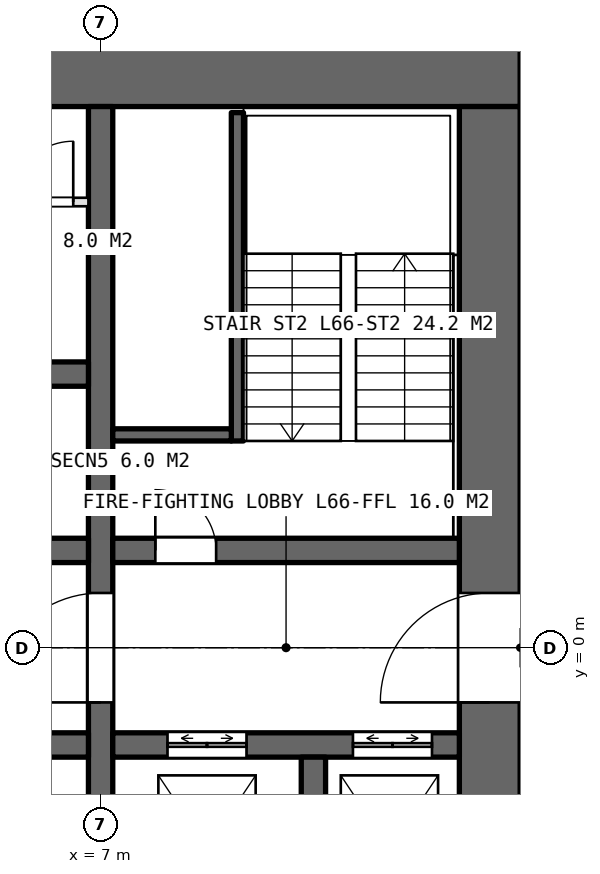
"""IFC4 building model, lengths in metres.
Left out: names, types, materials, properties, quantities, classifications, styles, units other than length and angle.
Written with IfcOpenShell. Run it as: python <this file> out.ifc"""

import sys

from ifc_helpers import new_model, si_unit, direction, frame, frame_2d, origin, place, context, subcontext, project, spatial, rectangle, extrude, element, fill, save


model = new_model("IFC4")
c1 = context("Model", 3, precision=1e-05, world=origin(), true_north=direction((0.0, 1.0)))
c2 = subcontext(c1, "Body", "Model", "MODEL_VIEW")
j1 = project(units=[si_unit("LENGTHUNIT", "METRE"), si_unit("PLANEANGLEUNIT", "RADIAN")], contexts=[c1])
p1 = place(None, origin())
s1 = spatial("IfcSite", under=j1, at=p1, CompositionType="ELEMENT")
p2 = place(p1, origin())
s2 = spatial("IfcBuilding", under=s1, at=p2, CompositionType="ELEMENT")
p3 = place(p2, frame((0.0, 0.0, 296.4)))
s3 = spatial("IfcBuildingStorey", under=s2, at=p3, CompositionType="ELEMENT", Elevation=296.4)
p4 = place(p3, frame((13.9, 9.4, 0.0), z_axis=(0.0, 0.0, 1.0), x_axis=(-1.0, 0.0, 0.0)))
e1 = element("IfcWall", 1, at=p4, inside=s3, PredefinedType="SHEAR", context=c2, shape_type="SweptSolid", body=[
    extrude(rectangle(XDim=27.8, YDim=1.0, at=frame_2d((13.9, 0.0))), origin(), (0.0, 0.0, 1.0), 4.2),
])
p5 = place(p4, frame((23.9, 0.0, 0.0)))
e2 = element("IfcOpeningElement", 2, at=p5, cuts=e1, PredefinedType="OPENING", context=c2, shape_type="SweptSolid", body=[
    extrude(rectangle(XDim=1.0, YDim=2.4, at=frame_2d((0.5, 1.2))), frame((0.0, 0.51, 0.0), z_axis=(0.0, -1.0, 0.0), x_axis=(1.0, 0.0, 0.0)), (0.0, 0.0, 1.0), 1.02),
])
p6 = place(p4, frame((13.0, 0.0, 0.0)))
e3 = element("IfcOpeningElement", 3, at=p6, cuts=e1, PredefinedType="OPENING", context=c2, shape_type="SweptSolid", body=[
    extrude(rectangle(XDim=1.8, YDim=2.4, at=frame_2d((0.9, 1.2))), frame((0.0, 0.51, 0.0), z_axis=(0.0, -1.0, 0.0), x_axis=(1.0, 0.0, 0.0)), (0.0, 0.0, 1.0), 1.02),
])
p7 = place(p3, frame((13.4, -8.9, 0.0), z_axis=(0.0, 0.0, 1.0), x_axis=(0.0, 1.0, 0.0)))
e4 = element("IfcWall", 4, at=p7, inside=s3, PredefinedType="SHEAR", context=c2, shape_type="SweptSolid", body=[
    extrude(rectangle(XDim=17.8, YDim=1.0, at=frame_2d((8.9, 0.0))), origin(), (0.0, 0.0, 1.0), 4.2),
])
p8 = place(p7, frame((8.0, 0.0, 0.0)))
e5 = element("IfcOpeningElement", 5, at=p8, cuts=e4, PredefinedType="OPENING", context=c2, shape_type="SweptSolid", body=[
    extrude(rectangle(XDim=1.8, YDim=2.4, at=frame_2d((0.9, 1.2))), frame((0.0, 0.51, 0.0), z_axis=(0.0, -1.0, 0.0), x_axis=(1.0, 0.0, 0.0)), (0.0, 0.0, 1.0), 1.02),
])
p9 = place(p3, frame((7.0, -8.9, 0.0), z_axis=(0.0, 0.0, 1.0), x_axis=(0.0, 1.0, 0.0)))
e6 = element("IfcWall", 6, at=p9, inside=s3, PredefinedType="SHEAR", context=c2, shape_type="SweptSolid", body=[
    extrude(rectangle(XDim=17.8, YDim=0.4, at=frame_2d((8.9, 0.0))), origin(), (0.0, 0.0, 1.0), 4.2),
])
p10 = place(p9, frame((8.0, 0.0, 0.0)))
e7 = element("IfcOpeningElement", 7, at=p10, cuts=e6, PredefinedType="OPENING", context=c2, shape_type="SweptSolid", body=[
    extrude(rectangle(XDim=1.8, YDim=2.4, at=frame_2d((0.9, 1.2))), frame((0.0, 0.21, 0.0), z_axis=(0.0, -1.0, 0.0), x_axis=(1.0, 0.0, 0.0)), (0.0, 0.0, 1.0), 0.42),
])
p11 = place(p3, frame((-6.8, 1.6, 0.0), z_axis=(0.0, 0.0, 1.0), x_axis=(1.0, 0.0, 0.0)))
e8 = element("IfcWall", 8, at=p11, inside=s3, PredefinedType="SHEAR", context=c2, shape_type="SweptSolid", body=[
    extrude(rectangle(XDim=13.6, YDim=0.4, at=frame_2d((6.8, 0.0))), origin(), (0.0, 0.0, 1.0), 4.2),
])
p12 = place(p11, frame((1.265, 0.0, 0.0)))
e9 = element("IfcOpeningElement", 9, at=p12, cuts=e8, PredefinedType="OPENING", context=c2, shape_type="SweptSolid", body=[
    extrude(rectangle(XDim=1.0, YDim=2.4, at=frame_2d((0.5, 1.2))), frame((0.0, 0.21, 0.0), z_axis=(0.0, -1.0, 0.0), x_axis=(1.0, 0.0, 0.0)), (0.0, 0.0, 1.0), 0.42),
])
p13 = place(p11, frame((4.0, 0.0, 0.0)))
e10 = element("IfcOpeningElement", 10, at=p13, cuts=e8, PredefinedType="OPENING", context=c2, shape_type="SweptSolid", body=[
    extrude(rectangle(XDim=1.0, YDim=2.4, at=frame_2d((0.5, 1.2))), frame((0.0, 0.21, 0.0), z_axis=(0.0, -1.0, 0.0), x_axis=(1.0, 0.0, 0.0)), (0.0, 0.0, 1.0), 0.42),
])
p14 = place(p11, frame((7.635, 0.0, 0.0)))
e11 = element("IfcOpeningElement", 11, at=p14, cuts=e8, PredefinedType="OPENING", context=c2, shape_type="SweptSolid", body=[
    extrude(rectangle(XDim=1.0, YDim=2.4, at=frame_2d((0.5, 1.2))), frame((0.0, 0.21, 0.0), z_axis=(0.0, -1.0, 0.0), x_axis=(1.0, 0.0, 0.0)), (0.0, 0.0, 1.0), 0.42),
])
p15 = place(p11, frame((11.9, 0.0, 0.0)))
e12 = element("IfcOpeningElement", 12, at=p15, cuts=e8, PredefinedType="OPENING", context=c2, shape_type="SweptSolid", body=[
    extrude(rectangle(XDim=1.0, YDim=2.4, at=frame_2d((0.5, 1.2))), frame((0.0, 0.21, 0.0), z_axis=(0.0, -1.0, 0.0), x_axis=(1.0, 0.0, 0.0)), (0.0, 0.0, 1.0), 0.42),
])
p16 = place(p3, frame((-6.8, -1.6, 0.0), z_axis=(0.0, 0.0, 1.0), x_axis=(1.0, 0.0, 0.0)))
e13 = element("IfcWall", 13, at=p16, inside=s3, PredefinedType="SHEAR", context=c2, shape_type="SweptSolid", body=[
    extrude(rectangle(XDim=13.6, YDim=0.4, at=frame_2d((6.8, 0.0))), origin(), (0.0, 0.0, 1.0), 4.2),
])
p17 = place(p16, frame((11.9, 0.0, 0.0)))
e14 = element("IfcOpeningElement", 14, at=p17, cuts=e13, PredefinedType="OPENING", context=c2, shape_type="SweptSolid", body=[
    extrude(rectangle(XDim=1.0, YDim=2.4, at=frame_2d((0.5, 1.2))), frame((0.0, 0.21, 0.0), z_axis=(0.0, -1.0, 0.0), x_axis=(1.0, 0.0, 0.0)), (0.0, 0.0, 1.0), 0.42),
])
p18 = place(p16, frame((4.5, 0.0, 0.0)))
e15 = element("IfcOpeningElement", 15, at=p18, cuts=e13, PredefinedType="OPENING", context=c2, shape_type="SweptSolid", body=[
    extrude(rectangle(XDim=1.8, YDim=2.4, at=frame_2d((0.9, 1.2))), frame((0.0, 0.21, 0.0), z_axis=(0.0, -1.0, 0.0), x_axis=(1.0, 0.0, 0.0)), (0.0, 0.0, 1.0), 0.42),
])
p19 = place(p3, frame((-6.8, 4.5, 0.0), z_axis=(0.0, 0.0, 1.0), x_axis=(1.0, 0.0, 0.0)))
e16 = element("IfcWall", 16, at=p19, inside=s3, PredefinedType="SHEAR", context=c2, shape_type="SweptSolid", body=[
    extrude(rectangle(XDim=13.6, YDim=0.4, at=frame_2d((6.8, 0.0))), origin(), (0.0, 0.0, 1.0), 4.2),
])
p20 = place(p3, frame((7.2, 1.6, 0.0), z_axis=(0.0, 0.0, 1.0), x_axis=(1.0, 0.0, 0.0)))
e17 = element("IfcWall", 17, at=p20, inside=s3, PredefinedType="SHEAR", context=c2, shape_type="SweptSolid", body=[
    extrude(rectangle(XDim=5.7, YDim=0.4, at=frame_2d((2.85, 0.0))), origin(), (0.0, 0.0, 1.0), 4.2),
])
p21 = place(p20, frame((0.7, 0.0, 0.0)))
e18 = element("IfcOpeningElement", 18, at=p21, cuts=e17, PredefinedType="OPENING", context=c2, shape_type="SweptSolid", body=[
    extrude(rectangle(XDim=1.0, YDim=2.4, at=frame_2d((0.5, 1.2))), frame((0.0, 0.21, 0.0), z_axis=(0.0, -1.0, 0.0), x_axis=(1.0, 0.0, 0.0)), (0.0, 0.0, 1.0), 0.42),
])
p22 = place(p3, frame((7.2, -1.6, 0.0), z_axis=(0.0, 0.0, 1.0), x_axis=(1.0, 0.0, 0.0)))
e19 = element("IfcWall", 19, at=p22, inside=s3, PredefinedType="SHEAR", context=c2, shape_type="SweptSolid", body=[
    extrude(rectangle(XDim=5.7, YDim=0.4, at=frame_2d((2.85, 0.0))), origin(), (0.0, 0.0, 1.0), 4.2),
])
p23 = place(p22, frame((0.9, 0.0, 0.0)))
e20 = element("IfcOpeningElement", 20, at=p23, cuts=e19, PredefinedType="OPENING", context=c2, shape_type="SweptSolid", body=[
    extrude(rectangle(XDim=1.3, YDim=2.4, at=frame_2d((0.65, 1.2))), frame((0.0, 0.21, 0.0), z_axis=(0.0, -1.0, 0.0), x_axis=(1.0, 0.0, 0.0)), (0.0, 0.0, 1.0), 0.42),
])
p24 = place(p22, frame((3.95, 0.0, 0.0)))
e21 = element("IfcOpeningElement", 21, at=p24, cuts=e19, PredefinedType="OPENING", context=c2, shape_type="SweptSolid", body=[
    extrude(rectangle(XDim=1.3, YDim=2.4, at=frame_2d((0.65, 1.2))), frame((0.0, 0.21, 0.0), z_axis=(0.0, -1.0, 0.0), x_axis=(1.0, 0.0, 0.0)), (0.0, 0.0, 1.0), 0.42),
])
p25 = place(p3, frame((10.5, -4.8, 0.0), z_axis=(0.0, 0.0, 1.0), x_axis=(0.0, 1.0, 0.0)))
e22 = element("IfcWall", 22, at=p25, inside=s3, PredefinedType="SHEAR", context=c2, shape_type="SweptSolid", body=[
    extrude(rectangle(XDim=3.0, YDim=0.4, at=frame_2d((1.5, 0.0))), origin(), (0.0, 0.0, 1.0), 4.2),
])
p26 = place(p3, frame((-6.8, 7.33, 0.0), z_axis=(0.0, 0.0, 1.0), x_axis=(1.0, 0.0, 0.0)))
e23 = element("IfcWall", 23, at=p26, inside=s3, PredefinedType="PARTITIONING", context=c2, shape_type="SweptSolid", body=[
    extrude(rectangle(XDim=13.6, YDim=0.14, at=frame_2d((6.8, 0.0))), origin(), (0.0, 0.0, 1.0), 3.95),
])
p27 = place(p26, frame((0.58, 0.0, 0.0)))
e24 = element("IfcOpeningElement", 24, at=p27, cuts=e23, PredefinedType="OPENING", context=c2, shape_type="SweptSolid", body=[
    extrude(rectangle(XDim=0.9, YDim=2.4, at=frame_2d((0.45, 1.2))), frame((0.0, 0.08, 0.0), z_axis=(0.0, -1.0, 0.0), x_axis=(1.0, 0.0, 0.0)), (0.0, 0.0, 1.0), 0.16),
])
p28 = place(p26, frame((4.38, 0.0, 0.0)))
e25 = element("IfcOpeningElement", 25, at=p28, cuts=e23, PredefinedType="OPENING", context=c2, shape_type="SweptSolid", body=[
    extrude(rectangle(XDim=1.1, YDim=2.4, at=frame_2d((0.55, 1.2))), frame((0.0, 0.08, 0.0), z_axis=(0.0, -1.0, 0.0), x_axis=(1.0, 0.0, 0.0)), (0.0, 0.0, 1.0), 0.16),
])
p29 = place(p26, frame((9.08, 0.0, 0.0)))
e26 = element("IfcOpeningElement", 26, at=p29, cuts=e23, PredefinedType="OPENING", context=c2, shape_type="SweptSolid", body=[
    extrude(rectangle(XDim=1.0, YDim=2.4, at=frame_2d((0.5, 1.2))), frame((0.0, 0.08, 0.0), z_axis=(0.0, -1.0, 0.0), x_axis=(1.0, 0.0, 0.0)), (0.0, 0.0, 1.0), 0.16),
])
p30 = place(p26, frame((12.35, 0.0, 0.0)))
e27 = element("IfcOpeningElement", 27, at=p30, cuts=e23, PredefinedType="OPENING", context=c2, shape_type="SweptSolid", body=[
    extrude(rectangle(XDim=1.0, YDim=2.4, at=frame_2d((0.5, 1.2))), frame((0.0, 0.08, 0.0), z_axis=(0.0, -1.0, 0.0), x_axis=(1.0, 0.0, 0.0)), (0.0, 0.0, 1.0), 0.16),
])
p31 = place(p3, frame((9.25, 3.4, 0.0), z_axis=(0.0, 0.0, 1.0), x_axis=(0.0, 1.0, 0.0)))
e28 = element("IfcWall", 28, at=p31, inside=s3, PredefinedType="SOLIDWALL", context=c2, shape_type="SweptSolid", body=[
    extrude(rectangle(XDim=5.4, YDim=0.2, at=frame_2d((2.7, 0.0))), origin(), (0.0, 0.0, 1.0), 4.2),
])
p32 = place(p3, frame((9.15, 3.5, 0.0), z_axis=(0.0, 0.0, 1.0), x_axis=(-1.0, 0.0, 0.0)))
e29 = element("IfcWall", 29, at=p32, inside=s3, PredefinedType="SOLIDWALL", context=c2, shape_type="SweptSolid", body=[
    extrude(rectangle(XDim=1.95, YDim=0.2, at=frame_2d((0.975, 0.0))), origin(), (0.0, 0.0, 1.0), 4.2),
])
p33 = place(p8, origin())
e30 = element("IfcDoor", 30, at=p33, inside=s3, OperationType="DOUBLE_DOOR_SINGLE_SWING", PredefinedType="DOOR", context=c2, shape_type="SweptSolid", body=[
    extrude(rectangle(XDim=1.8, YDim=2.4, at=frame_2d((0.9, 1.2))), frame((0.0, 0.025, 0.0), z_axis=(0.0, -1.0, 0.0), x_axis=(1.0, 0.0, 0.0)), (0.0, 0.0, 1.0), 0.05),
])
fill(e5, e30)
p34 = place(p10, origin())
e31 = element("IfcDoor", 31, at=p34, inside=s3, OperationType="DOUBLE_DOOR_SINGLE_SWING", PredefinedType="DOOR", context=c2, shape_type="SweptSolid", body=[
    extrude(rectangle(XDim=1.8, YDim=2.4, at=frame_2d((0.9, 1.2))), frame((0.0, 0.025, 0.0), z_axis=(0.0, -1.0, 0.0), x_axis=(1.0, 0.0, 0.0)), (0.0, 0.0, 1.0), 0.05),
])
fill(e7, e31)
p35 = place(p21, origin())
e32 = element("IfcDoor", 32, at=p35, inside=s3, OperationType="SINGLE_SWING_LEFT", PredefinedType="DOOR", context=c2, shape_type="SweptSolid", body=[
    extrude(rectangle(XDim=1.0, YDim=2.4, at=frame_2d((0.5, 1.2))), frame((0.0, 0.025, 0.0), z_axis=(0.0, -1.0, 0.0), x_axis=(1.0, 0.0, 0.0)), (0.0, 0.0, 1.0), 0.05),
])
fill(e18, e32)
p36 = place(p30, origin())
e33 = element("IfcDoor", 33, at=p36, inside=s3, OperationType="SINGLE_SWING_RIGHT", PredefinedType="DOOR", context=c2, shape_type="SweptSolid", body=[
    extrude(rectangle(XDim=1.0, YDim=2.4, at=frame_2d((0.5, 1.2))), frame((0.0, 0.025, 0.0), z_axis=(0.0, -1.0, 0.0), x_axis=(1.0, 0.0, 0.0)), (0.0, 0.0, 1.0), 0.05),
])
fill(e27, e33)
p37 = place(p23, origin())
e34 = element("IfcDoor", 34, at=p37, inside=s3, OperationType="DOUBLE_DOOR_SLIDING", PredefinedType="DOOR", context=c2, shape_type="SweptSolid", body=[
    extrude(rectangle(XDim=1.3, YDim=2.4, at=frame_2d((0.65, 1.2))), frame((0.0, 0.025, 0.0), z_axis=(0.0, -1.0, 0.0), x_axis=(1.0, 0.0, 0.0)), (0.0, 0.0, 1.0), 0.05),
])
fill(e20, e34)
p38 = place(p24, origin())
e35 = element("IfcDoor", 35, at=p38, inside=s3, OperationType="DOUBLE_DOOR_SLIDING", PredefinedType="DOOR", context=c2, shape_type="SweptSolid", body=[
    extrude(rectangle(XDim=1.3, YDim=2.4, at=frame_2d((0.65, 1.2))), frame((0.0, 0.025, 0.0), z_axis=(0.0, -1.0, 0.0), x_axis=(1.0, 0.0, 0.0)), (0.0, 0.0, 1.0), 0.05),
])
fill(e21, e35)
save(model, sys.argv[1])
